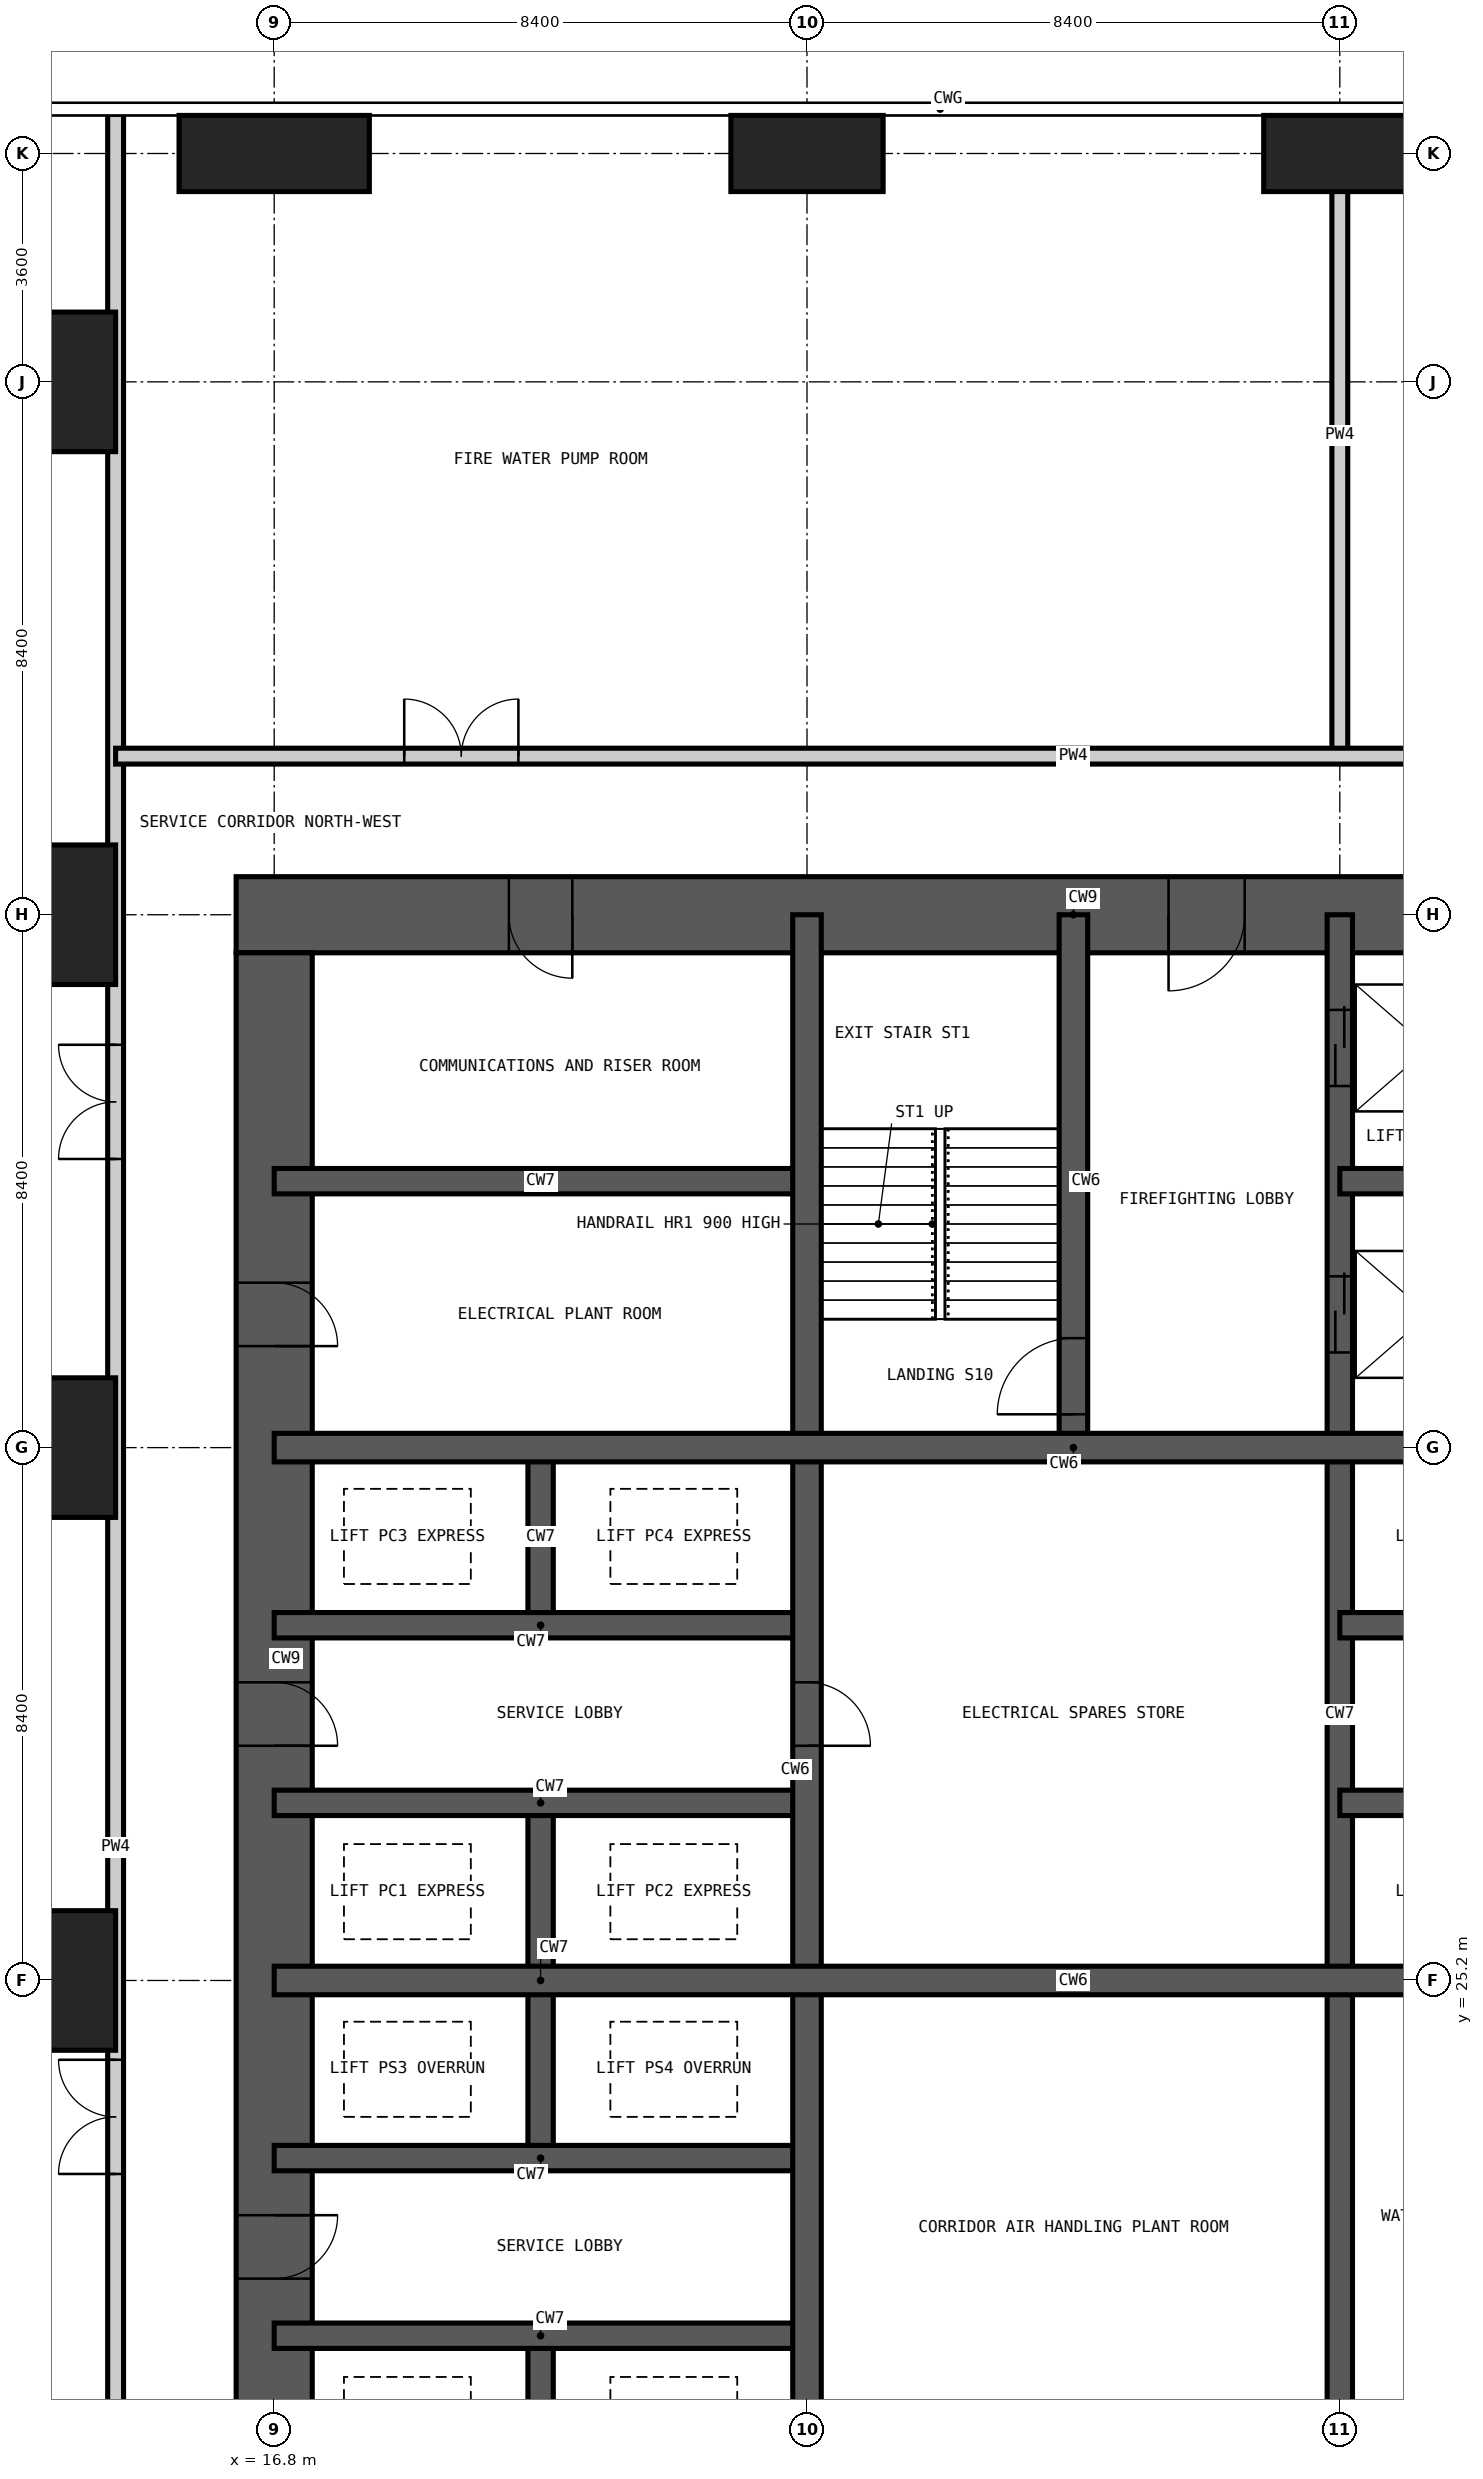
"""IFC4 building model, lengths in metres.
Left out: names, types, materials, properties, quantities, classifications, styles, units other than length and angle.
Written with IfcOpenShell. Run it as: python <this file> out.ifc"""

import sys

from ifc_helpers import new_model, si_unit, direction, frame, frame_2d, origin, origin_2d, place, context, subcontext, project, spatial, rectangle, extrude, element, fill, save


model = new_model("IFC4")
c1 = context("Model", 3, precision=1e-05, world=origin(), true_north=direction((0.0, 1.0)))
c2 = subcontext(c1, "Body", "Model", "MODEL_VIEW")
j1 = project(units=[si_unit("LENGTHUNIT", "METRE"), si_unit("PLANEANGLEUNIT", "RADIAN")], contexts=[c1])
p1 = place(None, origin())
s1 = spatial("IfcSite", under=j1, at=p1, CompositionType="ELEMENT")
p2 = place(p1, origin())
s2 = spatial("IfcBuilding", under=s1, at=p2, CompositionType="ELEMENT")
p3 = place(p2, frame((0.0, 0.0, 153.6)))
s3 = spatial("IfcBuildingStorey", under=s2, at=p3, CompositionType="ELEMENT", Elevation=153.6)
for number, where, z_axis, x_axis in (
    (1, (13.2, 25.2, -0.4), (0.0, 0.0, 1.0), (1.0, 0.0, 0.0)),
    (2, (13.2, 33.6, -0.4), (0.0, 0.0, 1.0), (1.0, 0.0, 0.0)),
    (3, (13.2, 42.0, -0.4), (0.0, 0.0, 1.0), (1.0, 0.0, 0.0)),
    (4, (13.2, 50.4, -0.4), (0.0, 0.0, 1.0), (1.0, 0.0, 0.0)),
):
    element("IfcColumn", number, at=place(p3, frame(where, z_axis=z_axis, x_axis=x_axis)), inside=s3, PredefinedType="COLUMN", context=c2, shape_type="SweptSolid", body=[
        extrude(rectangle(XDim=2.2, YDim=2.2, at=origin_2d()), origin(), (0.0, 0.0, 1.0), 5.45),
    ])
p4 = place(p3, frame((16.8, 54.0, -0.4), z_axis=(0.0, 0.0, 1.0), x_axis=(1.0, 0.0, 0.0)))
e5 = element("IfcColumn", 5, at=p4, inside=s3, PredefinedType="COLUMN", context=c2, shape_type="SweptSolid", body=[
    extrude(rectangle(XDim=3.0, YDim=1.2, at=origin_2d()), origin(), (0.0, 0.0, 1.0), 5.45),
])
for number, where, z_axis, x_axis in (
    (6, (25.2, 54.0, -0.4), (0.0, 0.0, 1.0), (1.0, 0.0, 0.0)),
    (7, (33.6, 54.0, -0.4), (0.0, 0.0, 1.0), (1.0, 0.0, 0.0)),
):
    element("IfcColumn", number, at=place(p3, frame(where, z_axis=z_axis, x_axis=x_axis)), inside=s3, PredefinedType="COLUMN", context=c2, shape_type="SweptSolid", body=[
        extrude(rectangle(XDim=2.4, YDim=1.2, at=origin_2d()), origin(), (0.0, 0.0, 1.0), 5.45),
    ])
p5 = place(p3, frame((42.6, 42.0, -0.4), z_axis=(0.0, 0.0, 1.0), x_axis=(-1.0, 0.0, 0.0)))
e8 = element("IfcWall", 8, at=p5, inside=s3, PredefinedType="SHEAR", context=c2, shape_type="SweptSolid", body=[
    extrude(rectangle(XDim=26.4, YDim=1.2, at=frame_2d((13.2, 0.0))), origin(), (0.0, 0.0, 1.0), 5.45),
])
p6 = place(p5, frame((21.1, 0.0, 0.4)))
e9 = element("IfcOpeningElement", 9, at=p6, cuts=e8, PredefinedType="OPENING", context=c2, shape_type="SweptSolid", body=[
    extrude(rectangle(XDim=1.0, YDim=2.1, at=frame_2d((0.5, 1.05))), frame((0.0, 0.61, 0.0), z_axis=(0.0, -1.0, 0.0), x_axis=(1.0, 0.0, 0.0)), (0.0, 0.0, 1.0), 1.22),
])
p7 = place(p5, frame((10.5, 0.0, 0.4)))
e10 = element("IfcOpeningElement", 10, at=p7, cuts=e8, PredefinedType="OPENING", context=c2, shape_type="SweptSolid", body=[
    extrude(rectangle(XDim=1.2, YDim=2.2, at=frame_2d((0.6, 1.1))), frame((0.0, 0.61, 0.0), z_axis=(0.0, -1.0, 0.0), x_axis=(1.0, 0.0, 0.0)), (0.0, 0.0, 1.0), 1.22),
])
p8 = place(p3, frame((16.8, 41.4, -0.4), z_axis=(0.0, 0.0, 1.0), x_axis=(0.0, -1.0, 0.0)))
e11 = element("IfcWall", 11, at=p8, inside=s3, PredefinedType="SHEAR", context=c2, shape_type="SweptSolid", body=[
    extrude(rectangle(XDim=24.0, YDim=1.2, at=frame_2d((12.0, 0.0))), origin(), (0.0, 0.0, 1.0), 5.45),
])
p9 = place(p8, frame((11.5, 0.0, 0.4)))
e12 = element("IfcOpeningElement", 12, at=p9, cuts=e11, PredefinedType="OPENING", context=c2, shape_type="SweptSolid", body=[
    extrude(rectangle(XDim=1.0, YDim=2.1, at=frame_2d((0.5, 1.05))), frame((0.0, 0.61, 0.0), z_axis=(0.0, -1.0, 0.0), x_axis=(1.0, 0.0, 0.0)), (0.0, 0.0, 1.0), 1.22),
])
p10 = place(p8, frame((19.9, 0.0, 0.4)))
e13 = element("IfcOpeningElement", 13, at=p10, cuts=e11, PredefinedType="OPENING", context=c2, shape_type="SweptSolid", body=[
    extrude(rectangle(XDim=1.0, YDim=2.1, at=frame_2d((0.5, 1.05))), frame((0.0, 0.61, 0.0), z_axis=(0.0, -1.0, 0.0), x_axis=(1.0, 0.0, 0.0)), (0.0, 0.0, 1.0), 1.22),
])
p11 = place(p8, frame((5.2, 0.0, 0.4)))
e14 = element("IfcOpeningElement", 14, at=p11, cuts=e11, PredefinedType="OPENING", context=c2, shape_type="SweptSolid", body=[
    extrude(rectangle(XDim=1.0, YDim=2.1, at=frame_2d((0.5, 1.05))), frame((0.0, 0.61, 0.0), z_axis=(0.0, -1.0, 0.0), x_axis=(1.0, 0.0, 0.0)), (0.0, 0.0, 1.0), 1.22),
])
p12 = place(p3, frame((21.0, 16.8, -0.4), z_axis=(0.0, 0.0, 1.0), x_axis=(0.0, 1.0, 0.0)))
e15 = element("IfcWall", 15, at=p12, inside=s3, PredefinedType="SHEAR", context=c2, shape_type="SweptSolid", body=[
    extrude(rectangle(XDim=2.8, YDim=0.4, at=frame_2d((1.4, 0.0))), origin(), (0.0, 0.0, 1.0), 5.45),
])
p13 = place(p3, frame((21.0, 22.4, -0.4), z_axis=(0.0, 0.0, 1.0), x_axis=(0.0, 1.0, 0.0)))
e16 = element("IfcWall", 16, at=p13, inside=s3, PredefinedType="SHEAR", context=c2, shape_type="SweptSolid", body=[
    extrude(rectangle(XDim=5.6, YDim=0.4, at=frame_2d((2.8, 0.0))), origin(), (0.0, 0.0, 1.0), 5.45),
])
p14 = place(p3, frame((21.0, 30.8, -0.4), z_axis=(0.0, 0.0, 1.0), x_axis=(0.0, 1.0, 0.0)))
e17 = element("IfcWall", 17, at=p14, inside=s3, PredefinedType="SHEAR", context=c2, shape_type="SweptSolid", body=[
    extrude(rectangle(XDim=2.8, YDim=0.4, at=frame_2d((1.4, 0.0))), origin(), (0.0, 0.0, 1.0), 5.45),
])
p15 = place(p3, frame((33.6, 16.8, -0.4), z_axis=(0.0, 0.0, 1.0), x_axis=(0.0, 1.0, 0.0)))
e18 = element("IfcWall", 18, at=p15, inside=s3, PredefinedType="SHEAR", context=c2, shape_type="SweptSolid", body=[
    extrude(rectangle(XDim=25.2, YDim=0.4, at=frame_2d((12.6, 0.0))), origin(), (0.0, 0.0, 1.0), 5.45),
])
p16 = place(p15, frame((22.5, 0.0, 0.4)))
e19 = element("IfcOpeningElement", 19, at=p16, cuts=e18, PredefinedType="OPENING", context=c2, shape_type="SweptSolid", body=[
    extrude(rectangle(XDim=1.2, YDim=2.2, at=frame_2d((0.6, 1.1))), frame((0.0, 0.21, 0.0), z_axis=(0.0, -1.0, 0.0), x_axis=(1.0, 0.0, 0.0)), (0.0, 0.0, 1.0), 0.42),
])
p17 = place(p15, frame((18.3, 0.0, 0.4)))
e20 = element("IfcOpeningElement", 20, at=p17, cuts=e18, PredefinedType="OPENING", context=c2, shape_type="SweptSolid", body=[
    extrude(rectangle(XDim=1.2, YDim=2.2, at=frame_2d((0.6, 1.1))), frame((0.0, 0.21, 0.0), z_axis=(0.0, -1.0, 0.0), x_axis=(1.0, 0.0, 0.0)), (0.0, 0.0, 1.0), 0.42),
])
for number, where, z_axis, x_axis in (
    (21, (16.8, 19.6, -0.4), (0.0, 0.0, 1.0), (1.0, 0.0, 0.0)),
    (22, (16.8, 22.4, -0.4), (0.0, 0.0, 1.0), (1.0, 0.0, 0.0)),
    (23, (16.8, 28.0, -0.4), (0.0, 0.0, 1.0), (1.0, 0.0, 0.0)),
    (24, (33.6, 28.0, -0.4), (0.0, 0.0, 1.0), (1.0, 0.0, 0.0)),
    (25, (16.8, 30.8, -0.4), (0.0, 0.0, 1.0), (1.0, 0.0, 0.0)),
    (26, (33.6, 30.8, -0.4), (0.0, 0.0, 1.0), (1.0, 0.0, 0.0)),
    (27, (16.8, 37.8, -0.4), (0.0, 0.0, 1.0), (1.0, 0.0, 0.0)),
):
    element("IfcWall", number, at=place(p3, frame(where, z_axis=z_axis, x_axis=x_axis)), inside=s3, PredefinedType="SHEAR", context=c2, shape_type="SweptSolid", body=[
        extrude(rectangle(XDim=8.4, YDim=0.4, at=frame_2d((4.2, 0.0))), origin(), (0.0, 0.0, 1.0), 5.45),
    ])
p18 = place(p3, frame((33.6, 37.8, -0.4), z_axis=(0.0, 0.0, 1.0), x_axis=(1.0, 0.0, 0.0)))
e28 = element("IfcWall", 28, at=p18, inside=s3, PredefinedType="SHEAR", context=c2, shape_type="SweptSolid", body=[
    extrude(rectangle(XDim=2.8, YDim=0.4, at=frame_2d((1.4, 0.0))), origin(), (0.0, 0.0, 1.0), 5.45),
])
p19 = place(p3, frame((25.2, 16.8, -0.4), z_axis=(0.0, 0.0, 1.0), x_axis=(0.0, 1.0, 0.0)))
e29 = element("IfcWall", 29, at=p19, inside=s3, PredefinedType="SHEAR", context=c2, shape_type="SweptSolid", body=[
    extrude(rectangle(XDim=25.2, YDim=0.45, at=frame_2d((12.6, 0.0))), origin(), (0.0, 0.0, 1.0), 5.45),
])
p20 = place(p19, frame((12.1, 0.0, 0.4)))
e30 = element("IfcOpeningElement", 30, at=p20, cuts=e29, PredefinedType="OPENING", context=c2, shape_type="SweptSolid", body=[
    extrude(rectangle(XDim=1.0, YDim=2.1, at=frame_2d((0.5, 1.05))), frame((0.0, 0.235, 0.0), z_axis=(0.0, -1.0, 0.0), x_axis=(1.0, 0.0, 0.0)), (0.0, 0.0, 1.0), 0.47),
])
p21 = place(p3, frame((29.4, 33.6, -0.4), z_axis=(0.0, 0.0, 1.0), x_axis=(0.0, 1.0, 0.0)))
e31 = element("IfcWall", 31, at=p21, inside=s3, PredefinedType="SHEAR", context=c2, shape_type="SweptSolid", body=[
    extrude(rectangle(XDim=8.4, YDim=0.45, at=frame_2d((4.2, 0.0))), origin(), (0.0, 0.0, 1.0), 5.45),
])
p22 = place(p21, frame((0.525, 0.0, 0.4)))
e32 = element("IfcOpeningElement", 32, at=p22, cuts=e31, PredefinedType="OPENING", context=c2, shape_type="SweptSolid", body=[
    extrude(rectangle(XDim=1.2, YDim=2.2, at=frame_2d((0.6, 1.1))), frame((0.0, 0.235, 0.0), z_axis=(0.0, -1.0, 0.0), x_axis=(1.0, 0.0, 0.0)), (0.0, 0.0, 1.0), 0.47),
])
for number, where, z_axis, x_axis in (
    (33, (16.8, 25.2, -0.4), (0.0, 0.0, 1.0), (1.0, 0.0, 0.0)),
    (34, (16.8, 33.6, -0.4), (0.0, 0.0, 1.0), (1.0, 0.0, 0.0)),
):
    element("IfcWall", number, at=place(p3, frame(where, z_axis=z_axis, x_axis=x_axis)), inside=s3, PredefinedType="SHEAR", context=c2, shape_type="SweptSolid", body=[
        extrude(rectangle(XDim=25.2, YDim=0.45, at=frame_2d((12.6, 0.0))), origin(), (0.0, 0.0, 1.0), 5.45),
    ])
p23 = place(p3, frame((14.3, -0.018, 0.0), z_axis=(0.0, 0.0, 1.0), x_axis=(0.0, 1.0, 0.0)))
e35 = element("IfcWall", 35, at=p23, inside=s3, PredefinedType="PARTITIONING", context=c2, shape_type="SweptSolid", body=[
    extrude(rectangle(XDim=54.636, YDim=0.25, at=frame_2d((27.318, 0.0))), origin(), (0.0, 0.0, 1.0), 5.05),
])
p24 = place(p23, frame((22.168, 0.0, 0.0)))
e36 = element("IfcOpeningElement", 36, at=p24, cuts=e35, PredefinedType="OPENING", context=c2, shape_type="SweptSolid", body=[
    extrude(rectangle(XDim=1.8, YDim=2.4, at=frame_2d((0.9, 1.2))), frame((0.0, 0.135, 0.0), z_axis=(0.0, -1.0, 0.0), x_axis=(1.0, 0.0, 0.0)), (0.0, 0.0, 1.0), 0.27),
])
p25 = place(p23, frame((38.168, 0.0, 0.0)))
e37 = element("IfcOpeningElement", 37, at=p25, cuts=e35, PredefinedType="OPENING", context=c2, shape_type="SweptSolid", body=[
    extrude(rectangle(XDim=1.8, YDim=2.4, at=frame_2d((0.9, 1.2))), frame((0.0, 0.135, 0.0), z_axis=(0.0, -1.0, 0.0), x_axis=(1.0, 0.0, 0.0)), (0.0, 0.0, 1.0), 0.27),
])
p26 = place(p3, frame((33.6, 44.5, 0.0), z_axis=(0.0, 0.0, 1.0), x_axis=(0.0, 1.0, 0.0)))
e38 = element("IfcWall", 38, at=p26, inside=s3, PredefinedType="PARTITIONING", context=c2, shape_type="SweptSolid", body=[
    extrude(rectangle(XDim=10.118, YDim=0.25, at=frame_2d((5.059, 0.0))), origin(), (0.0, 0.0, 1.0), 5.05),
])
p27 = place(p3, frame((14.3, 44.5, 0.0), z_axis=(0.0, 0.0, 1.0), x_axis=(1.0, 0.0, 0.0)))
e39 = element("IfcWall", 39, at=p27, inside=s3, PredefinedType="PARTITIONING", context=c2, shape_type="SweptSolid", body=[
    extrude(rectangle(XDim=30.2, YDim=0.25, at=frame_2d((15.1, 0.0))), origin(), (0.0, 0.0, 1.0), 5.05),
])
p28 = place(p27, frame((4.55, 0.0, 0.0)))
e40 = element("IfcOpeningElement", 40, at=p28, cuts=e39, PredefinedType="OPENING", context=c2, shape_type="SweptSolid", body=[
    extrude(rectangle(XDim=1.8, YDim=2.4, at=frame_2d((0.9, 1.2))), frame((0.0, 0.135, 0.0), z_axis=(0.0, -1.0, 0.0), x_axis=(1.0, 0.0, 0.0)), (0.0, 0.0, 1.0), 0.27),
])
p29 = place(p27, frame((23.85, 0.0, 0.0)))
e41 = element("IfcOpeningElement", 41, at=p29, cuts=e39, PredefinedType="OPENING", context=c2, shape_type="SweptSolid", body=[
    extrude(rectangle(XDim=1.8, YDim=2.4, at=frame_2d((0.9, 1.2))), frame((0.0, 0.135, 0.0), z_axis=(0.0, -1.0, 0.0), x_axis=(1.0, 0.0, 0.0)), (0.0, 0.0, 1.0), 0.27),
])
p30 = place(p22, origin())
e42 = element("IfcDoor", 42, at=p30, inside=s3, OperationType="SINGLE_SWING_LEFT", PredefinedType="DOOR", context=c2, shape_type="SweptSolid", body=[
    extrude(rectangle(XDim=1.2, YDim=2.2, at=frame_2d((0.6, 1.1))), frame((0.0, 0.025, 0.0), z_axis=(0.0, -1.0, 0.0), x_axis=(1.0, 0.0, 0.0)), (0.0, 0.0, 1.0), 0.05),
])
fill(e32, e42)
p31 = place(p16, origin())
e43 = element("IfcDoor", 43, at=p31, inside=s3, OperationType="DOUBLE_DOOR_SLIDING", PredefinedType="DOOR", context=c2, shape_type="SweptSolid", body=[
    extrude(rectangle(XDim=1.2, YDim=2.2, at=frame_2d((0.6, 1.1))), frame((0.0, 0.025, 0.0), z_axis=(0.0, -1.0, 0.0), x_axis=(1.0, 0.0, 0.0)), (0.0, 0.0, 1.0), 0.05),
])
fill(e19, e43)
p32 = place(p17, origin())
e44 = element("IfcDoor", 44, at=p32, inside=s3, OperationType="DOUBLE_DOOR_SLIDING", PredefinedType="DOOR", context=c2, shape_type="SweptSolid", body=[
    extrude(rectangle(XDim=1.2, YDim=2.2, at=frame_2d((0.6, 1.1))), frame((0.0, 0.025, 0.0), z_axis=(0.0, -1.0, 0.0), x_axis=(1.0, 0.0, 0.0)), (0.0, 0.0, 1.0), 0.05),
])
fill(e20, e44)
p33 = place(p24, origin())
e45 = element("IfcDoor", 45, at=p33, inside=s3, OperationType="DOUBLE_DOOR_DOUBLE_SWING", PredefinedType="DOOR", context=c2, shape_type="SweptSolid", body=[
    extrude(rectangle(XDim=1.8, YDim=2.4, at=frame_2d((0.9, 1.2))), frame((0.0, 0.025, 0.0), z_axis=(0.0, -1.0, 0.0), x_axis=(1.0, 0.0, 0.0)), (0.0, 0.0, 1.0), 0.05),
])
fill(e36, e45)
p34 = place(p25, origin())
e46 = element("IfcDoor", 46, at=p34, inside=s3, OperationType="DOUBLE_DOOR_DOUBLE_SWING", PredefinedType="DOOR", context=c2, shape_type="SweptSolid", body=[
    extrude(rectangle(XDim=1.8, YDim=2.4, at=frame_2d((0.9, 1.2))), frame((0.0, 0.025, 0.0), z_axis=(0.0, -1.0, 0.0), x_axis=(1.0, 0.0, 0.0)), (0.0, 0.0, 1.0), 0.05),
])
fill(e37, e46)
p35 = place(p28, origin())
e47 = element("IfcDoor", 47, at=p35, inside=s3, OperationType="DOUBLE_DOOR_DOUBLE_SWING", PredefinedType="DOOR", context=c2, shape_type="SweptSolid", body=[
    extrude(rectangle(XDim=1.8, YDim=2.4, at=frame_2d((0.9, 1.2))), frame((0.0, 0.025, 0.0), z_axis=(0.0, -1.0, 0.0), x_axis=(1.0, 0.0, 0.0)), (0.0, 0.0, 1.0), 0.05),
])
fill(e40, e47)
p36 = place(p9, origin())
e48 = element("IfcDoor", 48, at=p36, inside=s3, OperationType="SINGLE_SWING_RIGHT", PredefinedType="DOOR", context=c2, shape_type="SweptSolid", body=[
    extrude(rectangle(XDim=1.0, YDim=2.1, at=frame_2d((0.5, 1.05))), frame((0.0, 0.025, 0.0), z_axis=(0.0, -1.0, 0.0), x_axis=(1.0, 0.0, 0.0)), (0.0, 0.0, 1.0), 0.05),
])
fill(e12, e48)
p37 = place(p10, origin())
e49 = element("IfcDoor", 49, at=p37, inside=s3, OperationType="SINGLE_SWING_LEFT", PredefinedType="DOOR", context=c2, shape_type="SweptSolid", body=[
    extrude(rectangle(XDim=1.0, YDim=2.1, at=frame_2d((0.5, 1.05))), frame((0.0, 0.025, 0.0), z_axis=(0.0, -1.0, 0.0), x_axis=(1.0, 0.0, 0.0)), (0.0, 0.0, 1.0), 0.05),
])
fill(e13, e49)
p38 = place(p11, origin())
e50 = element("IfcDoor", 50, at=p38, inside=s3, OperationType="SINGLE_SWING_RIGHT", PredefinedType="DOOR", context=c2, shape_type="SweptSolid", body=[
    extrude(rectangle(XDim=1.0, YDim=2.1, at=frame_2d((0.5, 1.05))), frame((0.0, 0.025, 0.0), z_axis=(0.0, -1.0, 0.0), x_axis=(1.0, 0.0, 0.0)), (0.0, 0.0, 1.0), 0.05),
])
fill(e14, e50)
p39 = place(p6, origin())
e51 = element("IfcDoor", 51, at=p39, inside=s3, OperationType="SINGLE_SWING_LEFT", PredefinedType="DOOR", context=c2, shape_type="SweptSolid", body=[
    extrude(rectangle(XDim=1.0, YDim=2.1, at=frame_2d((0.5, 1.05))), frame((0.0, 0.025, 0.0), z_axis=(0.0, -1.0, 0.0), x_axis=(1.0, 0.0, 0.0)), (0.0, 0.0, 1.0), 0.05),
])
fill(e9, e51)
p40 = place(p20, frame((1.0, 0.0, 0.0), z_axis=(0.0, 0.0, 1.0), x_axis=(-1.0, 0.0, 0.0)))
e52 = element("IfcDoor", 52, at=p40, inside=s3, OperationType="SINGLE_SWING_RIGHT", PredefinedType="DOOR", context=c2, shape_type="SweptSolid", body=[
    extrude(rectangle(XDim=1.0, YDim=2.1, at=frame_2d((0.5, 1.05))), frame((0.0, 0.025, 0.0), z_axis=(0.0, -1.0, 0.0), x_axis=(1.0, 0.0, 0.0)), (0.0, 0.0, 1.0), 0.05),
])
fill(e30, e52)
p41 = place(p7, origin())
e53 = element("IfcDoor", 53, at=p41, inside=s3, OperationType="SINGLE_SWING_RIGHT", PredefinedType="DOOR", context=c2, shape_type="SweptSolid", body=[
    extrude(rectangle(XDim=1.2, YDim=2.2, at=frame_2d((0.6, 1.1))), frame((0.0, 0.025, 0.0), z_axis=(0.0, -1.0, 0.0), x_axis=(1.0, 0.0, 0.0)), (0.0, 0.0, 1.0), 0.05),
])
fill(e10, e53)
save(model, sys.argv[1])
